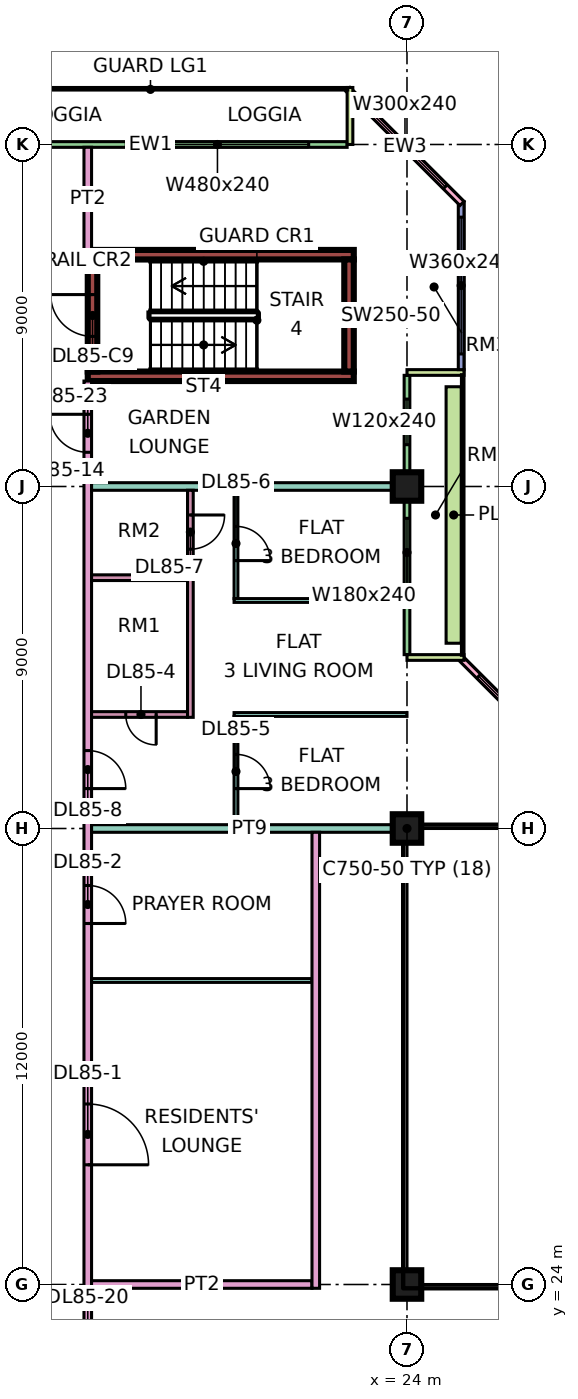
"""IFC4 building model, lengths in metres.
Left out: names, types, materials, properties, quantities, classifications, styles, units other than length and angle.
Written with IfcOpenShell. Run it as: python <this file> out.ifc"""

import sys

from ifc_helpers import new_model, si_unit, direction, frame, frame_2d, origin, origin_2d, place, context, subcontext, project, spatial, rectangle, extrude, element, fill, save


model = new_model("IFC4")
c1 = context("Model", 3, precision=1e-05, world=origin(), true_north=direction((0.0, 1.0)))
c2 = subcontext(c1, "Body", "Model", "MODEL_VIEW")
j1 = project(units=[si_unit("LENGTHUNIT", "METRE"), si_unit("PLANEANGLEUNIT", "RADIAN")], contexts=[c1])
p1 = place(None, origin())
s1 = spatial("IfcSite", under=j1, at=p1, CompositionType="ELEMENT")
p2 = place(p1, origin())
s2 = spatial("IfcBuilding", under=s1, at=p2, CompositionType="ELEMENT")
p3 = place(p2, frame((0.0, 0.0, 365.15)))
s3 = spatial("IfcBuildingStorey", under=s2, at=p3, CompositionType="ELEMENT", Elevation=365.15)
for number, where, z_axis, x_axis in (
    (1, (24.0, 24.0, 0.0), (0.0, 0.0, 1.0), (1.0, 0.0, 0.0)),
    (2, (24.0, 36.0, 0.0), (0.0, 0.0, 1.0), (1.0, 0.0, 0.0)),
    (3, (24.0, 45.0, 0.0), (0.0, 0.0, 1.0), (1.0, 0.0, 0.0)),
):
    element("IfcColumn", number, at=place(p3, frame(where, z_axis=z_axis, x_axis=x_axis)), inside=s3, PredefinedType="COLUMN", context=c2, shape_type="SweptSolid", body=[
        extrude(rectangle(XDim=0.75, YDim=0.75, at=origin_2d()), origin(), (0.0, 0.0, 1.0), 3.75),
    ])
for number, where, z_axis, x_axis in (
    (4, (15.6, 47.9, 0.0), (0.0, 0.0, 1.0), (1.0, 0.0, 0.0)),
    (5, (15.6, 51.1, 0.0), (0.0, 0.0, 1.0), (1.0, 0.0, 0.0)),
):
    element("IfcWall", number, at=place(p3, frame(where, z_axis=z_axis, x_axis=x_axis)), inside=s3, PredefinedType="SHEAR", context=c2, shape_type="SweptSolid", body=[
        extrude(rectangle(XDim=7.0, YDim=0.25, at=frame_2d((3.5, 0.0))), origin(), (0.0, 0.0, 1.0), 3.75),
    ])
p4 = place(p3, frame((15.725, 48.025, 0.0), z_axis=(0.0, 0.0, 1.0), x_axis=(0.0, 1.0, 0.0)))
e6 = element("IfcWall", 6, at=p4, inside=s3, PredefinedType="SHEAR", context=c2, shape_type="SweptSolid", body=[
    extrude(rectangle(XDim=2.95, YDim=0.25, at=frame_2d((1.475, 0.0))), origin(), (0.0, 0.0, 1.0), 3.75),
])
p5 = place(p4, frame((0.925, 0.0, 0.0)))
e7 = element("IfcOpeningElement", 7, at=p5, cuts=e6, PredefinedType="OPENING", context=c2, shape_type="SweptSolid", body=[
    extrude(rectangle(XDim=1.1, YDim=2.2, at=frame_2d((0.55, 1.1))), frame((0.0, 0.135, 0.0), z_axis=(0.0, -1.0, 0.0), x_axis=(1.0, 0.0, 0.0)), (0.0, 0.0, 1.0), 0.27),
])
p6 = place(p3, frame((22.475, 48.025, 0.0), z_axis=(0.0, 0.0, 1.0), x_axis=(0.0, 1.0, 0.0)))
e8 = element("IfcWall", 8, at=p6, inside=s3, PredefinedType="SHEAR", context=c2, shape_type="SweptSolid", body=[
    extrude(rectangle(XDim=2.95, YDim=0.25, at=frame_2d((1.475, 0.0))), origin(), (0.0, 0.0, 1.0), 3.75),
])
p7 = place(p3, frame((28.447, 37.447, 0.0), z_axis=(0.0, 0.0, 1.0), x_axis=(-0.707106781187, 0.707106781187, 0.0)))
e9 = element("IfcWall", 9, at=p7, inside=s3, PredefinedType="SOLIDWALL", context=c2, shape_type="SweptSolid", body=[
    extrude(rectangle(XDim=4.243, YDim=0.15, at=frame_2d((2.121, 0.0))), origin(), (0.0, 0.0, 1.0), 3.35),
])
p8 = place(p7, frame((0.621, 0.0, 0.45)))
e10 = element("IfcOpeningElement", 10, at=p8, cuts=e9, PredefinedType="OPENING", context=c2, shape_type="SweptSolid", body=[
    extrude(rectangle(XDim=3.0, YDim=2.4, at=frame_2d((1.5, 1.2))), frame((0.0, 0.085, 0.0), z_axis=(0.0, -1.0, 0.0), x_axis=(1.0, 0.0, 0.0)), (0.0, 0.0, 1.0), 0.17),
])
p9 = place(p3, frame((24.0, 40.575, 0.0), z_axis=(0.0, 0.0, 1.0), x_axis=(0.0, 1.0, 0.0)))
e11 = element("IfcWall", 11, at=p9, inside=s3, PredefinedType="SOLIDWALL", context=c2, shape_type="SweptSolid", body=[
    extrude(rectangle(XDim=7.35, YDim=0.15, at=frame_2d((3.675, 0.0))), origin(), (0.0, 0.0, 1.0), 3.35),
])
p10 = place(p9, frame((1.788, 0.0, 0.45)))
e12 = element("IfcOpeningElement", 12, at=p10, cuts=e11, PredefinedType="OPENING", context=c2, shape_type="SweptSolid", body=[
    extrude(rectangle(XDim=1.8, YDim=2.4, at=frame_2d((0.9, 1.2))), frame((0.0, 0.085, 0.0), z_axis=(0.0, -1.0, 0.0), x_axis=(1.0, 0.0, 0.0)), (0.0, 0.0, 1.0), 0.17),
])
p11 = place(p9, frame((5.525, 0.0, 0.45)))
e13 = element("IfcOpeningElement", 13, at=p11, cuts=e11, PredefinedType="OPENING", context=c2, shape_type="SweptSolid", body=[
    extrude(rectangle(XDim=1.2, YDim=2.4, at=frame_2d((0.6, 1.2))), frame((0.0, 0.085, 0.0), z_axis=(0.0, -1.0, 0.0), x_axis=(1.0, 0.0, 0.0)), (0.0, 0.0, 1.0), 0.17),
])
for number, where, z_axis, x_axis in (
    (14, (25.5, 40.5, 0.0), (0.0, 0.0, 1.0), (-1.0, 0.0, 0.0)),
    (15, (25.5, 48.0, 0.0), (0.0, 0.0, 1.0), (-1.0, 0.0, 0.0)),
):
    element("IfcWall", number, at=place(p3, frame(where, z_axis=z_axis, x_axis=x_axis)), inside=s3, PredefinedType="SOLIDWALL", context=c2, shape_type="SweptSolid", body=[
        extrude(rectangle(XDim=1.5, YDim=0.15, at=frame_2d((0.75, 0.0))), origin(), (0.0, 0.0, 1.0), 3.35),
    ])
p12 = place(p3, frame((25.425, 48.075, 0.0), z_axis=(0.0, 0.0, 1.0), x_axis=(0.0, 1.0, 0.0)))
e16 = element("IfcWall", 16, at=p12, inside=s3, PredefinedType="SOLIDWALL", context=c2, shape_type="SweptSolid", body=[
    extrude(rectangle(XDim=4.425, YDim=0.15, at=frame_2d((2.212, 0.0))), origin(), (0.0, 0.0, 1.0), 3.35),
])
p13 = place(p12, frame((0.413, 0.0, 0.45)))
e17 = element("IfcOpeningElement", 17, at=p13, cuts=e16, PredefinedType="OPENING", context=c2, shape_type="SweptSolid", body=[
    extrude(rectangle(XDim=3.6, YDim=2.4, at=frame_2d((1.8, 1.2))), frame((0.0, 0.085, 0.0), z_axis=(0.0, -1.0, 0.0), x_axis=(1.0, 0.0, 0.0)), (0.0, 0.0, 1.0), 0.17),
])
p14 = place(p3, frame((25.447, 52.447, 0.0), z_axis=(0.0, 0.0, 1.0), x_axis=(-0.707106781187, 0.707106781187, 0.0)))
e18 = element("IfcWall", 18, at=p14, inside=s3, PredefinedType="SOLIDWALL", context=c2, shape_type="SweptSolid", body=[
    extrude(rectangle(XDim=4.243, YDim=0.15, at=frame_2d((2.121, 0.0))), origin(), (0.0, 0.0, 1.0), 3.35),
])
p15 = place(p14, frame((0.621, 0.0, 0.45)))
e19 = element("IfcOpeningElement", 19, at=p15, cuts=e18, PredefinedType="OPENING", context=c2, shape_type="SweptSolid", body=[
    extrude(rectangle(XDim=3.0, YDim=2.4, at=frame_2d((1.5, 1.2))), frame((0.0, 0.085, 0.0), z_axis=(0.0, -1.0, 0.0), x_axis=(1.0, 0.0, 0.0)), (0.0, 0.0, 1.0), 0.17),
])
p16 = place(p3, frame((22.425, 54.0, 0.0), z_axis=(0.0, 0.0, 1.0), x_axis=(-1.0, 0.0, 0.0)))
e20 = element("IfcWall", 20, at=p16, inside=s3, PredefinedType="SOLIDWALL", context=c2, shape_type="SweptSolid", body=[
    extrude(rectangle(XDim=10.35, YDim=0.15, at=frame_2d((5.175, 0.0))), origin(), (0.0, 0.0, 1.0), 3.35),
])
p17 = place(p16, frame((1.012, 0.0, 0.45)))
e21 = element("IfcOpeningElement", 21, at=p17, cuts=e20, PredefinedType="OPENING", context=c2, shape_type="SweptSolid", body=[
    extrude(rectangle(XDim=4.8, YDim=2.4, at=frame_2d((2.4, 1.2))), frame((0.0, 0.085, 0.0), z_axis=(0.0, -1.0, 0.0), x_axis=(1.0, 0.0, 0.0)), (0.0, 0.0, 1.0), 0.17),
])
p18 = place(p3, frame((22.5, 55.5, 0.0), z_axis=(0.0, 0.0, 1.0), x_axis=(0.0, -1.0, 0.0)))
e22 = element("IfcWall", 22, at=p18, inside=s3, PredefinedType="SOLIDWALL", context=c2, shape_type="SweptSolid", body=[
    extrude(rectangle(XDim=1.5, YDim=0.15, at=frame_2d((0.75, 0.0))), origin(), (0.0, 0.0, 1.0), 3.35),
])
p19 = place(p3, frame((25.229, 40.875, 0.0), z_axis=(0.0, 0.0, 1.0), x_axis=(0.0, 1.0, 0.0)))
e23 = element("IfcWall", 23, at=p19, inside=s3, PredefinedType="SOLIDWALL", context=c2, shape_type="SweptSolid", body=[
    extrude(rectangle(XDim=6.75, YDim=0.4, at=frame_2d((3.375, 0.0))), origin(), (0.0, 0.0, 1.0), 0.7),
])
p20 = place(p3, frame((15.6, 20.0, 0.0), z_axis=(0.0, 0.0, 1.0), x_axis=(0.0, 1.0, 0.0)))
e24 = element("IfcWall", 24, at=p20, inside=s3, PredefinedType="PARTITIONING", context=c2, shape_type="SweptSolid", body=[
    extrude(rectangle(XDim=27.775, YDim=0.2, at=frame_2d((13.887, 0.0))), origin(), (0.0, 0.0, 1.0), 3.35),
])
p21 = place(p20, frame((7.15, 0.0, 0.0)))
e25 = element("IfcOpeningElement", 25, at=p21, cuts=e24, PredefinedType="OPENING", context=c2, shape_type="SweptSolid", body=[
    extrude(rectangle(XDim=1.6, YDim=2.1, at=frame_2d((0.8, 1.05))), frame((0.0, 0.11, 0.0), z_axis=(0.0, -1.0, 0.0), x_axis=(1.0, 0.0, 0.0)), (0.0, 0.0, 1.0), 0.22),
])
p22 = place(p20, frame((13.5, 0.0, 0.0)))
e26 = element("IfcOpeningElement", 26, at=p22, cuts=e24, PredefinedType="OPENING", context=c2, shape_type="SweptSolid", body=[
    extrude(rectangle(XDim=1.0, YDim=2.1, at=frame_2d((0.5, 1.05))), frame((0.0, 0.11, 0.0), z_axis=(0.0, -1.0, 0.0), x_axis=(1.0, 0.0, 0.0)), (0.0, 0.0, 1.0), 0.22),
])
p23 = place(p20, frame((17.05, 0.0, 0.0)))
e27 = element("IfcOpeningElement", 27, at=p23, cuts=e24, PredefinedType="OPENING", context=c2, shape_type="SweptSolid", body=[
    extrude(rectangle(XDim=1.0, YDim=2.1, at=frame_2d((0.5, 1.05))), frame((0.0, 0.11, 0.0), z_axis=(0.0, -1.0, 0.0), x_axis=(1.0, 0.0, 0.0)), (0.0, 0.0, 1.0), 0.22),
])
p24 = place(p20, frame((1.15, 0.0, 0.0)))
e28 = element("IfcOpeningElement", 28, at=p24, cuts=e24, PredefinedType="OPENING", context=c2, shape_type="SweptSolid", body=[
    extrude(rectangle(XDim=1.8, YDim=2.1, at=frame_2d((0.9, 1.05))), frame((0.0, 0.11, 0.0), z_axis=(0.0, -1.0, 0.0), x_axis=(1.0, 0.0, 0.0)), (0.0, 0.0, 1.0), 0.22),
])
p25 = place(p20, frame((25.9, 0.0, 0.0)))
e29 = element("IfcOpeningElement", 29, at=p25, cuts=e24, PredefinedType="OPENING", context=c2, shape_type="SweptSolid", body=[
    extrude(rectangle(XDim=1.0, YDim=2.1, at=frame_2d((0.5, 1.05))), frame((0.0, 0.11, 0.0), z_axis=(0.0, -1.0, 0.0), x_axis=(1.0, 0.0, 0.0)), (0.0, 0.0, 1.0), 0.22),
])
p26 = place(p3, frame((15.6, 51.225, 0.0), z_axis=(0.0, 0.0, 1.0), x_axis=(0.0, 1.0, 0.0)))
e30 = element("IfcWall", 30, at=p26, inside=s3, PredefinedType="PARTITIONING", context=c2, shape_type="SweptSolid", body=[
    extrude(rectangle(XDim=2.701, YDim=0.2, at=frame_2d((1.351, 0.0))), origin(), (0.0, 0.0, 1.0), 3.35),
])
p27 = place(p3, frame((15.7, 24.0, 0.0), z_axis=(0.0, 0.0, 1.0), x_axis=(1.0, 0.0, 0.0)))
e31 = element("IfcWall", 31, at=p27, inside=s3, PredefinedType="PARTITIONING", context=c2, shape_type="SweptSolid", body=[
    extrude(rectangle(XDim=5.8, YDim=0.2, at=frame_2d((2.9, 0.0))), origin(), (0.0, 0.0, 1.0), 3.35),
])
p28 = place(p3, frame((15.7, 32.0, 0.0), z_axis=(0.0, 0.0, 1.0), x_axis=(1.0, 0.0, 0.0)))
e32 = element("IfcWall", 32, at=p28, inside=s3, PredefinedType="PARTITIONING", context=c2, shape_type="SweptSolid", body=[
    extrude(rectangle(XDim=5.8, YDim=0.1, at=frame_2d((2.9, 0.0))), origin(), (0.0, 0.0, 1.0), 3.35),
])
p29 = place(p3, frame((15.7, 36.0, 0.0), z_axis=(0.0, 0.0, 1.0), x_axis=(1.0, 0.0, 0.0)))
e33 = element("IfcWall", 33, at=p29, inside=s3, PredefinedType="PARTITIONING", context=c2, shape_type="SweptSolid", body=[
    extrude(rectangle(XDim=8.3, YDim=0.2, at=frame_2d((4.15, 0.0))), origin(), (0.0, 0.0, 1.0), 3.35),
])
p30 = place(p3, frame((15.7, 39.0, 0.0), z_axis=(0.0, 0.0, 1.0), x_axis=(1.0, 0.0, 0.0)))
e34 = element("IfcWall", 34, at=p30, inside=s3, PredefinedType="PARTITIONING", context=c2, shape_type="SweptSolid", body=[
    extrude(rectangle(XDim=2.525, YDim=0.15, at=frame_2d((1.263, 0.0))), origin(), (0.0, 0.0, 1.0), 3.35),
])
p31 = place(p30, frame((0.9, 0.0, 0.0)))
e35 = element("IfcOpeningElement", 35, at=p31, cuts=e34, PredefinedType="OPENING", context=c2, shape_type="SweptSolid", body=[
    extrude(rectangle(XDim=0.8, YDim=2.1, at=frame_2d((0.4, 1.05))), frame((0.0, 0.085, 0.0), z_axis=(0.0, -1.0, 0.0), x_axis=(1.0, 0.0, 0.0)), (0.0, 0.0, 1.0), 0.17),
])
p32 = place(p3, frame((15.7, 42.6, 0.0), z_axis=(0.0, 0.0, 1.0), x_axis=(1.0, 0.0, 0.0)))
e36 = element("IfcWall", 36, at=p32, inside=s3, PredefinedType="PARTITIONING", context=c2, shape_type="SweptSolid", body=[
    extrude(rectangle(XDim=2.525, YDim=0.15, at=frame_2d((1.263, 0.0))), origin(), (0.0, 0.0, 1.0), 3.35),
])
p33 = place(p3, frame((15.7, 45.0, 0.0), z_axis=(0.0, 0.0, 1.0), x_axis=(1.0, 0.0, 0.0)))
e37 = element("IfcWall", 37, at=p33, inside=s3, PredefinedType="PARTITIONING", context=c2, shape_type="SweptSolid", body=[
    extrude(rectangle(XDim=8.226, YDim=0.2, at=frame_2d((4.113, 0.0))), origin(), (0.0, 0.0, 1.0), 3.35),
])
p34 = place(p3, frame((18.3, 38.925, 0.0), z_axis=(0.0, 0.0, 1.0), x_axis=(0.0, 1.0, 0.0)))
e38 = element("IfcWall", 38, at=p34, inside=s3, PredefinedType="PARTITIONING", context=c2, shape_type="SweptSolid", body=[
    extrude(rectangle(XDim=5.975, YDim=0.15, at=frame_2d((2.987, 0.0))), origin(), (0.0, 0.0, 1.0), 3.35),
])
p35 = place(p34, frame((4.425, 0.0, 0.0)))
e39 = element("IfcOpeningElement", 39, at=p35, cuts=e38, PredefinedType="OPENING", context=c2, shape_type="SweptSolid", body=[
    extrude(rectangle(XDim=0.9, YDim=2.1, at=frame_2d((0.45, 1.05))), frame((0.0, 0.085, 0.0), z_axis=(0.0, -1.0, 0.0), x_axis=(1.0, 0.0, 0.0)), (0.0, 0.0, 1.0), 0.17),
])
p36 = place(p3, frame((19.45, 39.0, 0.0), z_axis=(0.0, 0.0, 1.0), x_axis=(1.0, 0.0, 0.0)))
e40 = element("IfcWall", 40, at=p36, inside=s3, PredefinedType="PARTITIONING", context=c2, shape_type="SweptSolid", body=[
    extrude(rectangle(XDim=4.55, YDim=0.1, at=frame_2d((2.275, 0.0))), origin(), (0.0, 0.0, 1.0), 3.35),
])
p37 = place(p3, frame((19.45, 42.0, 0.0), z_axis=(0.0, 0.0, 1.0), x_axis=(1.0, 0.0, 0.0)))
e41 = element("IfcWall", 41, at=p37, inside=s3, PredefinedType="PARTITIONING", context=c2, shape_type="SweptSolid", body=[
    extrude(rectangle(XDim=4.476, YDim=0.1, at=frame_2d((2.238, 0.0))), origin(), (0.0, 0.0, 1.0), 3.35),
])
p38 = place(p3, frame((19.5, 36.1, 0.0), z_axis=(0.0, 0.0, 1.0), x_axis=(0.0, 1.0, 0.0)))
e42 = element("IfcWall", 42, at=p38, inside=s3, PredefinedType="PARTITIONING", context=c2, shape_type="SweptSolid", body=[
    extrude(rectangle(XDim=2.85, YDim=0.1, at=frame_2d((1.425, 0.0))), origin(), (0.0, 0.0, 1.0), 3.35),
])
p39 = place(p38, frame((0.95, 0.0, 0.0)))
e43 = element("IfcOpeningElement", 43, at=p39, cuts=e42, PredefinedType="OPENING", context=c2, shape_type="SweptSolid", body=[
    extrude(rectangle(XDim=0.9, YDim=2.1, at=frame_2d((0.45, 1.05))), frame((0.0, 0.06, 0.0), z_axis=(0.0, -1.0, 0.0), x_axis=(1.0, 0.0, 0.0)), (0.0, 0.0, 1.0), 0.12),
])
p40 = place(p3, frame((19.5, 42.05, 0.0), z_axis=(0.0, 0.0, 1.0), x_axis=(0.0, 1.0, 0.0)))
e44 = element("IfcWall", 44, at=p40, inside=s3, PredefinedType="PARTITIONING", context=c2, shape_type="SweptSolid", body=[
    extrude(rectangle(XDim=2.85, YDim=0.1, at=frame_2d((1.425, 0.0))), origin(), (0.0, 0.0, 1.0), 3.35),
])
p41 = place(p40, frame((1.0, 0.0, 0.0)))
e45 = element("IfcOpeningElement", 45, at=p41, cuts=e44, PredefinedType="OPENING", context=c2, shape_type="SweptSolid", body=[
    extrude(rectangle(XDim=0.9, YDim=2.1, at=frame_2d((0.45, 1.05))), frame((0.0, 0.06, 0.0), z_axis=(0.0, -1.0, 0.0), x_axis=(1.0, 0.0, 0.0)), (0.0, 0.0, 1.0), 0.12),
])
p42 = place(p3, frame((21.6, 23.9, 0.0), z_axis=(0.0, 0.0, 1.0), x_axis=(0.0, 1.0, 0.0)))
e46 = element("IfcWall", 46, at=p42, inside=s3, PredefinedType="PARTITIONING", context=c2, shape_type="SweptSolid", body=[
    extrude(rectangle(XDim=12.0, YDim=0.2, at=frame_2d((6.0, 0.0))), origin(), (0.0, 0.0, 1.0), 3.35),
])
p43 = place(p8, origin())
e47 = element("IfcWindow", 47, at=p43, inside=s3, PartitioningType="SINGLE_PANEL", PredefinedType="WINDOW", context=c2, shape_type="SweptSolid", body=[
    extrude(rectangle(XDim=3.0, YDim=2.4, at=frame_2d((1.5, 1.2))), frame((0.0, 0.03, 0.0), z_axis=(0.0, -1.0, 0.0), x_axis=(1.0, 0.0, 0.0)), (0.0, 0.0, 1.0), 0.06),
])
fill(e10, e47)
p44 = place(p10, origin())
e48 = element("IfcWindow", 48, at=p44, inside=s3, PartitioningType="SINGLE_PANEL", PredefinedType="WINDOW", context=c2, shape_type="SweptSolid", body=[
    extrude(rectangle(XDim=1.8, YDim=2.4, at=frame_2d((0.9, 1.2))), frame((0.0, 0.03, 0.0), z_axis=(0.0, -1.0, 0.0), x_axis=(1.0, 0.0, 0.0)), (0.0, 0.0, 1.0), 0.06),
])
fill(e12, e48)
p45 = place(p11, origin())
e49 = element("IfcWindow", 49, at=p45, inside=s3, PartitioningType="SINGLE_PANEL", PredefinedType="WINDOW", context=c2, shape_type="SweptSolid", body=[
    extrude(rectangle(XDim=1.2, YDim=2.4, at=frame_2d((0.6, 1.2))), frame((0.0, 0.03, 0.0), z_axis=(0.0, -1.0, 0.0), x_axis=(1.0, 0.0, 0.0)), (0.0, 0.0, 1.0), 0.06),
])
fill(e13, e49)
p46 = place(p13, origin())
e50 = element("IfcWindow", 50, at=p46, inside=s3, PartitioningType="SINGLE_PANEL", PredefinedType="WINDOW", context=c2, shape_type="SweptSolid", body=[
    extrude(rectangle(XDim=3.6, YDim=2.4, at=frame_2d((1.8, 1.2))), frame((0.0, 0.03, 0.0), z_axis=(0.0, -1.0, 0.0), x_axis=(1.0, 0.0, 0.0)), (0.0, 0.0, 1.0), 0.06),
])
fill(e17, e50)
p47 = place(p15, origin())
e51 = element("IfcWindow", 51, at=p47, inside=s3, PartitioningType="SINGLE_PANEL", PredefinedType="WINDOW", context=c2, shape_type="SweptSolid", body=[
    extrude(rectangle(XDim=3.0, YDim=2.4, at=frame_2d((1.5, 1.2))), frame((0.0, 0.03, 0.0), z_axis=(0.0, -1.0, 0.0), x_axis=(1.0, 0.0, 0.0)), (0.0, 0.0, 1.0), 0.06),
])
fill(e19, e51)
p48 = place(p17, origin())
e52 = element("IfcWindow", 52, at=p48, inside=s3, PartitioningType="SINGLE_PANEL", PredefinedType="WINDOW", context=c2, shape_type="SweptSolid", body=[
    extrude(rectangle(XDim=4.8, YDim=2.4, at=frame_2d((2.4, 1.2))), frame((0.0, 0.03, 0.0), z_axis=(0.0, -1.0, 0.0), x_axis=(1.0, 0.0, 0.0)), (0.0, 0.0, 1.0), 0.06),
])
fill(e21, e52)
p49 = place(p5, frame((1.1, 0.0, 0.0), z_axis=(0.0, 0.0, 1.0), x_axis=(-1.0, 0.0, 0.0)))
e53 = element("IfcDoor", 53, at=p49, inside=s3, OperationType="SINGLE_SWING_RIGHT", PredefinedType="DOOR", context=c2, shape_type="SweptSolid", body=[
    extrude(rectangle(XDim=1.1, YDim=2.2, at=frame_2d((0.55, 1.1))), frame((0.0, 0.025, 0.0), z_axis=(0.0, -1.0, 0.0), x_axis=(1.0, 0.0, 0.0)), (0.0, 0.0, 1.0), 0.05),
])
fill(e7, e53)
p50 = place(p21, frame((1.6, 0.0, 0.0), z_axis=(0.0, 0.0, 1.0), x_axis=(-1.0, 0.0, 0.0)))
e54 = element("IfcDoor", 54, at=p50, inside=s3, OperationType="DOUBLE_DOOR_SINGLE_SWING", PredefinedType="DOOR", context=c2, shape_type="SweptSolid", body=[
    extrude(rectangle(XDim=1.6, YDim=2.1, at=frame_2d((0.8, 1.05))), frame((0.0, 0.025, 0.0), z_axis=(0.0, -1.0, 0.0), x_axis=(1.0, 0.0, 0.0)), (0.0, 0.0, 1.0), 0.05),
])
fill(e25, e54)
p51 = place(p22, frame((1.0, 0.0, 0.0), z_axis=(0.0, 0.0, 1.0), x_axis=(-1.0, 0.0, 0.0)))
e55 = element("IfcDoor", 55, at=p51, inside=s3, OperationType="SINGLE_SWING_LEFT", PredefinedType="DOOR", context=c2, shape_type="SweptSolid", body=[
    extrude(rectangle(XDim=1.0, YDim=2.1, at=frame_2d((0.5, 1.05))), frame((0.0, 0.025, 0.0), z_axis=(0.0, -1.0, 0.0), x_axis=(1.0, 0.0, 0.0)), (0.0, 0.0, 1.0), 0.05),
])
fill(e26, e55)
p52 = place(p31, origin())
e56 = element("IfcDoor", 56, at=p52, inside=s3, OperationType="SINGLE_SWING_RIGHT", PredefinedType="DOOR", context=c2, shape_type="SweptSolid", body=[
    extrude(rectangle(XDim=0.8, YDim=2.1, at=frame_2d((0.4, 1.05))), frame((0.0, 0.025, 0.0), z_axis=(0.0, -1.0, 0.0), x_axis=(1.0, 0.0, 0.0)), (0.0, 0.0, 1.0), 0.05),
])
fill(e35, e56)
p53 = place(p39, frame((0.9, 0.0, 0.0), z_axis=(0.0, 0.0, 1.0), x_axis=(-1.0, 0.0, 0.0)))
e57 = element("IfcDoor", 57, at=p53, inside=s3, OperationType="SINGLE_SWING_LEFT", PredefinedType="DOOR", context=c2, shape_type="SweptSolid", body=[
    extrude(rectangle(XDim=0.9, YDim=2.1, at=frame_2d((0.45, 1.05))), frame((0.0, 0.025, 0.0), z_axis=(0.0, -1.0, 0.0), x_axis=(1.0, 0.0, 0.0)), (0.0, 0.0, 1.0), 0.05),
])
fill(e43, e57)
p54 = place(p41, frame((0.9, 0.0, 0.0), z_axis=(0.0, 0.0, 1.0), x_axis=(-1.0, 0.0, 0.0)))
e58 = element("IfcDoor", 58, at=p54, inside=s3, OperationType="SINGLE_SWING_LEFT", PredefinedType="DOOR", context=c2, shape_type="SweptSolid", body=[
    extrude(rectangle(XDim=0.9, YDim=2.1, at=frame_2d((0.45, 1.05))), frame((0.0, 0.025, 0.0), z_axis=(0.0, -1.0, 0.0), x_axis=(1.0, 0.0, 0.0)), (0.0, 0.0, 1.0), 0.05),
])
fill(e45, e58)
p55 = place(p35, origin())
e59 = element("IfcDoor", 59, at=p55, inside=s3, OperationType="SINGLE_SWING_RIGHT", PredefinedType="DOOR", context=c2, shape_type="SweptSolid", body=[
    extrude(rectangle(XDim=0.9, YDim=2.1, at=frame_2d((0.45, 1.05))), frame((0.0, 0.025, 0.0), z_axis=(0.0, -1.0, 0.0), x_axis=(1.0, 0.0, 0.0)), (0.0, 0.0, 1.0), 0.05),
])
fill(e39, e59)
p56 = place(p23, frame((1.0, 0.0, 0.0), z_axis=(0.0, 0.0, 1.0), x_axis=(-1.0, 0.0, 0.0)))
e60 = element("IfcDoor", 60, at=p56, inside=s3, OperationType="SINGLE_SWING_LEFT", PredefinedType="DOOR", context=c2, shape_type="SweptSolid", body=[
    extrude(rectangle(XDim=1.0, YDim=2.1, at=frame_2d((0.5, 1.05))), frame((0.0, 0.025, 0.0), z_axis=(0.0, -1.0, 0.0), x_axis=(1.0, 0.0, 0.0)), (0.0, 0.0, 1.0), 0.05),
])
fill(e27, e60)
p57 = place(p25, frame((1.0, 0.0, 0.0), z_axis=(0.0, 0.0, 1.0), x_axis=(-1.0, 0.0, 0.0)))
e61 = element("IfcDoor", 61, at=p57, inside=s3, OperationType="SINGLE_SWING_RIGHT", PredefinedType="DOOR", context=c2, shape_type="SweptSolid", body=[
    extrude(rectangle(XDim=1.0, YDim=2.1, at=frame_2d((0.5, 1.05))), frame((0.0, 0.025, 0.0), z_axis=(0.0, -1.0, 0.0), x_axis=(1.0, 0.0, 0.0)), (0.0, 0.0, 1.0), 0.05),
])
fill(e29, e61)
save(model, sys.argv[1])
